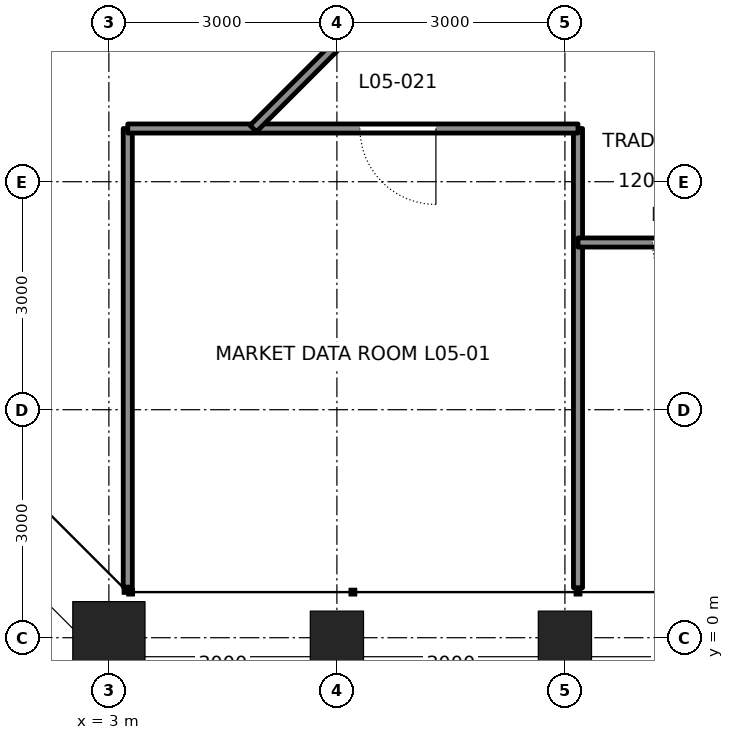
"""IFC4 building model, lengths in metres.
Left out: names, types, materials, properties, quantities, classifications, styles, units other than length and angle.
Written with IfcOpenShell. Run it as: python <this file> out.ifc"""

import sys

from ifc_helpers import new_model, si_unit, direction, frame, frame_2d, origin, origin_2d, place, context, subcontext, project, spatial, rectangle, hollow_rectangle, extrude, element, fill, save


model = new_model("IFC4")
c1 = context("Model", 3, precision=1e-05, world=origin(), true_north=direction((0.0, 1.0)))
c2 = subcontext(c1, "Body", "Model", "MODEL_VIEW")
j1 = project(units=[si_unit("LENGTHUNIT", "METRE"), si_unit("PLANEANGLEUNIT", "RADIAN")], contexts=[c1])
p1 = place(None, origin())
s1 = spatial("IfcSite", under=j1, at=p1, CompositionType="ELEMENT")
p2 = place(p1, origin())
s2 = spatial("IfcBuilding", under=s1, at=p2, CompositionType="ELEMENT")
p3 = place(p2, frame((0.0, 0.0, 28.8)))
s3 = spatial("IfcBuildingStorey", under=s2, at=p3, CompositionType="ELEMENT", Elevation=28.8)
p4 = place(p3, frame((3.0, 0.0, 0.0), z_axis=(0.0, 0.0, 1.0), x_axis=(0.0, -1.0, 0.0)))
e1 = element("IfcColumn", 1, at=p4, inside=s3, PredefinedType="COLUMN", context=c2, shape_type="SweptSolid", body=[
    extrude(hollow_rectangle(XDim=0.95, YDim=0.95, WallThickness=0.095, at=origin_2d()), origin(), (0.0, 0.0, 1.0), 4.5),
])
for number, where, z_axis, x_axis in (
    (2, (6.0, 0.0, 0.0), (0.0, 0.0, 1.0), (0.0, -1.0, 0.0)),
    (3, (9.0, 0.0, 0.0), (0.0, 0.0, 1.0), (0.0, -1.0, 0.0)),
):
    element("IfcColumn", number, at=place(p3, frame(where, z_axis=z_axis, x_axis=x_axis)), inside=s3, PredefinedType="COLUMN", context=c2, shape_type="SweptSolid", body=[
        extrude(hollow_rectangle(XDim=0.7, YDim=0.7, WallThickness=0.07, at=origin_2d()), origin(), (0.0, 0.0, 1.0), 4.5),
    ])
p5 = place(p3, frame((3.249, 0.666, -0.3), z_axis=(0.0, 0.0, 1.0), x_axis=(0.0, 1.0, 0.0)))
e4 = element("IfcWall", 4, at=p5, inside=s3, PredefinedType="PARTITIONING", context=c2, shape_type="SweptSolid", body=[
    extrude(rectangle(XDim=6.034, YDim=0.12, at=frame_2d((3.017, 0.0))), origin(), (0.0, 0.0, 1.0), 4.34),
])
p6 = place(p3, frame((9.172, 0.657, -0.3), z_axis=(0.0, 0.0, 1.0), x_axis=(0.0, 1.0, 0.0)))
e5 = element("IfcWall", 5, at=p6, inside=s3, PredefinedType="PARTITIONING", context=c2, shape_type="SweptSolid", body=[
    extrude(rectangle(XDim=6.042, YDim=0.12, at=frame_2d((3.021, 0.0))), origin(), (0.0, 0.0, 1.0), 4.34),
])
p7 = place(p3, frame((3.249, 6.7, -0.3), z_axis=(0.0, 0.0, 1.0), x_axis=(1.0, 0.0, 0.0)))
e6 = element("IfcWall", 6, at=p7, inside=s3, PredefinedType="PARTITIONING", context=c2, shape_type="SweptSolid", body=[
    extrude(rectangle(XDim=5.924, YDim=0.12, at=frame_2d((2.962, 0.0))), origin(), (0.0, 0.0, 1.0), 4.34),
])
p8 = place(p7, frame((3.054, 0.0, 0.3)))
e7 = element("IfcOpeningElement", 7, at=p8, cuts=e6, PredefinedType="OPENING", context=c2, shape_type="SweptSolid", body=[
    extrude(rectangle(XDim=1.0, YDim=2.4, at=frame_2d((0.5, 1.2))), frame((0.0, 0.07, 0.0), z_axis=(0.0, -1.0, 0.0), x_axis=(1.0, 0.0, 0.0)), (0.0, 0.0, 1.0), 0.14),
])
p9 = place(p3, frame((9.172, 5.2, -0.3), z_axis=(0.0, 0.0, 1.0), x_axis=(1.0, 0.0, 0.0)))
e8 = element("IfcWall", 8, at=p9, inside=s3, PredefinedType="PARTITIONING", context=c2, shape_type="SweptSolid", body=[
    extrude(rectangle(XDim=2.962, YDim=0.12, at=frame_2d((1.481, 0.0))), origin(), (0.0, 0.0, 1.0), 4.34),
])
p10 = place(p9, frame((0.981, 0.0, 0.3)))
e9 = element("IfcOpeningElement", 9, at=p10, cuts=e8, PredefinedType="OPENING", context=c2, shape_type="SweptSolid", body=[
    extrude(rectangle(XDim=1.0, YDim=2.4, at=frame_2d((0.5, 1.2))), frame((0.0, 0.07, 0.0), z_axis=(0.0, -1.0, 0.0), x_axis=(1.0, 0.0, 0.0)), (0.0, 0.0, 1.0), 0.14),
])
p11 = place(p3, frame((10.2, 12.0, -0.3), z_axis=(0.0, 0.0, 1.0), x_axis=(-0.707106781187, -0.707106781187, 0.0)))
e10 = element("IfcWall", 10, at=p11, inside=s3, PredefinedType="PARTITIONING", context=c2, shape_type="SweptSolid", body=[
    extrude(rectangle(XDim=7.497, YDim=0.12, at=frame_2d((3.749, 0.0))), origin(), (0.0, 0.0, 1.0), 4.34),
])
p12 = place(p11, frame((1.3, 0.0, 0.3)))
e11 = element("IfcOpeningElement", 11, at=p12, cuts=e10, PredefinedType="OPENING", context=c2, shape_type="SweptSolid", body=[
    extrude(rectangle(XDim=1.0, YDim=2.4, at=frame_2d((0.5, 1.2))), frame((0.0, 0.07, 0.0), z_axis=(0.0, -1.0, 0.0), x_axis=(1.0, 0.0, 0.0)), (0.0, 0.0, 1.0), 0.14),
])
p13 = place(p8, frame((1.0, 0.0, 0.0), z_axis=(0.0, 0.0, 1.0), x_axis=(-1.0, 0.0, 0.0)))
e12 = element("IfcDoor", 12, at=p13, inside=s3, OperationType="SINGLE_SWING_LEFT", PredefinedType="DOOR", context=c2, shape_type="SweptSolid", body=[
    extrude(rectangle(XDim=1.0, YDim=2.4, at=frame_2d((0.5, 1.2))), frame((0.0, 0.025, 0.0), z_axis=(0.0, -1.0, 0.0), x_axis=(1.0, 0.0, 0.0)), (0.0, 0.0, 1.0), 0.05),
])
fill(e7, e12)
p14 = place(p10, frame((1.0, 0.0, 0.0), z_axis=(0.0, 0.0, 1.0), x_axis=(-1.0, 0.0, 0.0)))
e13 = element("IfcDoor", 13, at=p14, inside=s3, OperationType="SINGLE_SWING_LEFT", PredefinedType="DOOR", context=c2, shape_type="SweptSolid", body=[
    extrude(rectangle(XDim=1.0, YDim=2.4, at=frame_2d((0.5, 1.2))), frame((0.0, 0.025, 0.0), z_axis=(0.0, -1.0, 0.0), x_axis=(1.0, 0.0, 0.0)), (0.0, 0.0, 1.0), 0.05),
])
fill(e9, e13)
save(model, sys.argv[1])
